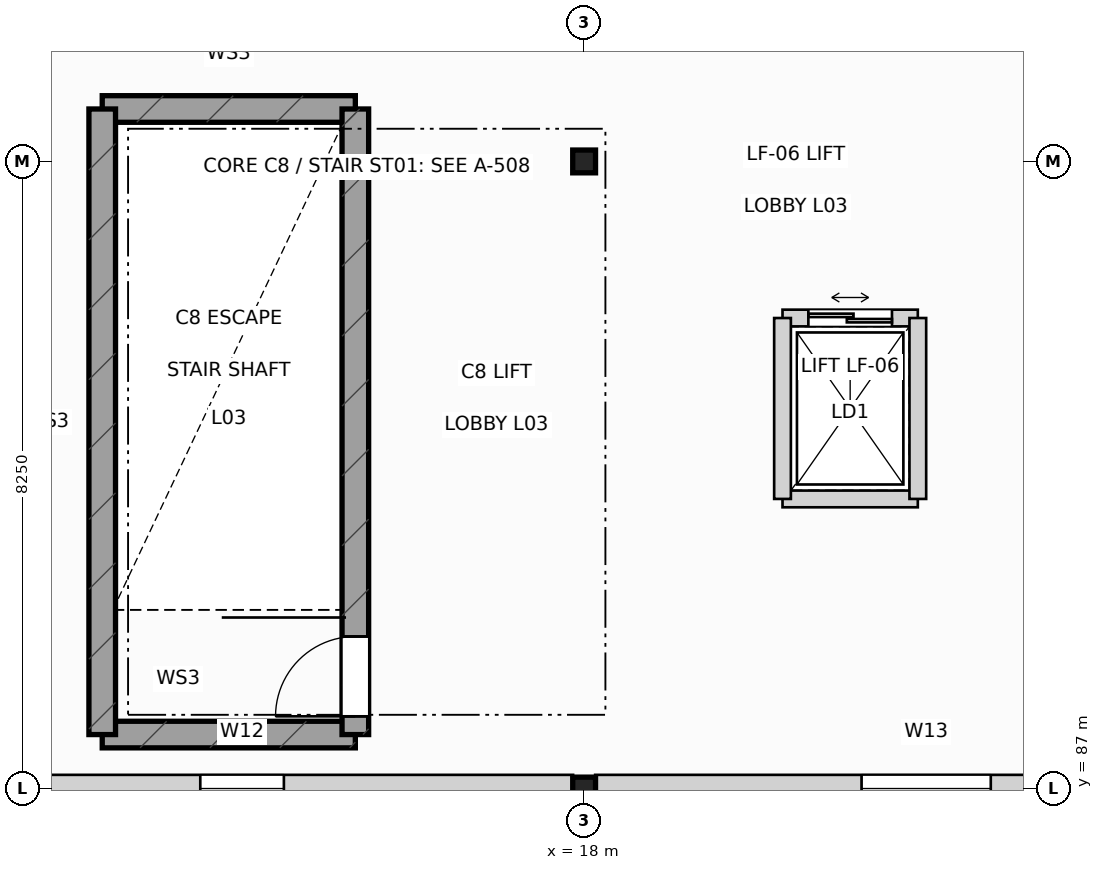
"""IFC4 building model, lengths in metres.
Left out: names, types, materials, properties, quantities, classifications, styles, units other than length and angle.
Written with IfcOpenShell. Run it as: python <this file> out.ifc"""

import sys

from ifc_helpers import new_model, si_unit, direction, frame, frame_2d, origin, origin_2d, place, context, subcontext, project, spatial, rectangle, i_section, extrude, element, fill, save


model = new_model("IFC4")
c1 = context("Model", 3, precision=1e-05, world=origin(), true_north=direction((0.0, 1.0)))
c2 = subcontext(c1, "Body", "Model", "MODEL_VIEW")
j1 = project(units=[si_unit("LENGTHUNIT", "METRE"), si_unit("PLANEANGLEUNIT", "RADIAN")], contexts=[c1])
p1 = place(None, origin())
s1 = spatial("IfcSite", under=j1, at=p1, CompositionType="ELEMENT")
p2 = place(p1, origin())
s2 = spatial("IfcBuilding", under=s1, at=p2, CompositionType="ELEMENT")
p3 = place(p2, frame((0.0, 0.0, 16.8)))
s3 = spatial("IfcBuildingStorey", under=s2, at=p3, CompositionType="ELEMENT", Elevation=16.8)
for number, where, z_axis, x_axis in (
    (1, (18.0, 87.0, 0.0), (0.0, 0.0, 1.0), (1.0, 0.0, 0.0)),
    (2, (18.0, 95.25, 0.0), (0.0, 0.0, 1.0), (1.0, 0.0, 0.0)),
):
    element("IfcColumn", number, at=place(p3, frame(where, z_axis=z_axis, x_axis=x_axis)), inside=s3, PredefinedType="COLUMN", context=c2, shape_type="SweptSolid", body=[
        extrude(i_section(OverallWidth=0.3, OverallDepth=0.3, WebThickness=0.011, FlangeThickness=0.019, at=origin_2d()), origin(), (0.0, 0.0, 1.0), 4.8),
    ])
p4 = place(p3, frame((17.855, 87.0, 0.0), z_axis=(0.0, 0.0, 1.0), x_axis=(-1.0, 0.0, 0.0)))
e3 = element("IfcWall", 3, at=p4, inside=s3, PredefinedType="SOLIDWALL", context=c2, shape_type="SweptSolid", body=[
    extrude(rectangle(XDim=8.71, YDim=0.36, at=frame_2d((4.355, 0.0))), origin(), (0.0, 0.0, 1.0), 4.485),
])
p5 = place(p4, frame((3.805, 0.0, 0.85)))
e4 = element("IfcOpeningElement", 4, at=p5, cuts=e3, PredefinedType="OPENING", context=c2, shape_type="SweptSolid", body=[
    extrude(rectangle(XDim=1.1, YDim=1.8, at=frame_2d((0.55, 0.9))), frame((0.0, 0.19, 0.0), z_axis=(0.0, -1.0, 0.0), x_axis=(1.0, 0.0, 0.0)), (0.0, 0.0, 1.0), 0.38),
])
p6 = place(p3, frame((26.855, 87.0, 0.0), z_axis=(0.0, 0.0, 1.0), x_axis=(-1.0, 0.0, 0.0)))
e5 = element("IfcWall", 5, at=p6, inside=s3, PredefinedType="SOLIDWALL", context=c2, shape_type="SweptSolid", body=[
    extrude(rectangle(XDim=8.71, YDim=0.36, at=frame_2d((4.355, 0.0))), origin(), (0.0, 0.0, 1.0), 3.735),
])
p7 = place(p6, frame((3.505, 0.0, 0.85)))
e6 = element("IfcOpeningElement", 6, at=p7, cuts=e5, PredefinedType="OPENING", context=c2, shape_type="SweptSolid", body=[
    extrude(rectangle(XDim=1.7, YDim=2.15, at=frame_2d((0.85, 1.075))), frame((0.0, 0.19, 0.0), z_axis=(0.0, -1.0, 0.0), x_axis=(1.0, 0.0, 0.0)), (0.0, 0.0, 1.0), 0.38),
])
for number, where, z_axis, x_axis in (
    (7, (11.66, 87.71, 0.0), (0.0, 0.0, 1.0), (1.0, 0.0, 0.0)),
    (8, (11.66, 95.94, 0.0), (0.0, 0.0, 1.0), (1.0, 0.0, 0.0)),
):
    element("IfcWall", number, at=place(p3, frame(where, z_axis=z_axis, x_axis=x_axis)), inside=s3, PredefinedType="SHEAR", context=c2, shape_type="SweptSolid", body=[
        extrude(rectangle(XDim=3.33, YDim=0.35, at=frame_2d((1.665, 0.0))), origin(), (0.0, 0.0, 1.0), 4.52),
    ])
p8 = place(p3, frame((11.66, 87.71, 0.0), z_axis=(0.0, 0.0, 1.0), x_axis=(0.0, 1.0, 0.0)))
e9 = element("IfcWall", 9, at=p8, inside=s3, PredefinedType="SHEAR", context=c2, shape_type="SweptSolid", body=[
    extrude(rectangle(XDim=8.23, YDim=0.35, at=frame_2d((4.115, 0.0))), origin(), (0.0, 0.0, 1.0), 4.52),
])
p9 = place(p3, frame((14.99, 87.71, 0.0), z_axis=(0.0, 0.0, 1.0), x_axis=(0.0, 1.0, 0.0)))
e10 = element("IfcWall", 10, at=p9, inside=s3, PredefinedType="SHEAR", context=c2, shape_type="SweptSolid", body=[
    extrude(rectangle(XDim=8.23, YDim=0.35, at=frame_2d((4.115, 0.0))), origin(), (0.0, 0.0, 1.0), 4.52),
])
p10 = place(p9, frame((0.24, 0.0, 0.0)))
e11 = element("IfcOpeningElement", 11, at=p10, cuts=e10, PredefinedType="OPENING", context=c2, shape_type="SweptSolid", body=[
    extrude(rectangle(XDim=1.05, YDim=2.18, at=frame_2d((0.525, 1.09))), frame((0.0, 0.185, 0.0), z_axis=(0.0, -1.0, 0.0), x_axis=(1.0, 0.0, 0.0)), (0.0, 0.0, 1.0), 0.37),
])
p11 = place(p3, frame((20.61, 90.81, 0.0), z_axis=(0.0, 0.0, 1.0), x_axis=(1.0, 0.0, 0.0)))
e12 = element("IfcWall", 12, at=p11, inside=s3, PredefinedType="PARTITIONING", context=c2, shape_type="SweptSolid", body=[
    extrude(rectangle(XDim=1.78, YDim=0.22, at=frame_2d((0.89, 0.0))), origin(), (0.0, 0.0, 1.0), 4.485),
])
p12 = place(p3, frame((20.61, 93.19, 0.0), z_axis=(0.0, 0.0, 1.0), x_axis=(1.0, 0.0, 0.0)))
e13 = element("IfcWall", 13, at=p12, inside=s3, PredefinedType="PARTITIONING", context=c2, shape_type="SweptSolid", body=[
    extrude(rectangle(XDim=1.78, YDim=0.22, at=frame_2d((0.89, 0.0))), origin(), (0.0, 0.0, 1.0), 4.485),
])
p13 = place(p12, frame((0.34, 0.0, 0.0)))
e14 = element("IfcOpeningElement", 14, at=p13, cuts=e13, PredefinedType="OPENING", context=c2, shape_type="SweptSolid", body=[
    extrude(rectangle(XDim=1.1, YDim=2.18, at=frame_2d((0.55, 1.09))), frame((0.0, 0.12, 0.0), z_axis=(0.0, -1.0, 0.0), x_axis=(1.0, 0.0, 0.0)), (0.0, 0.0, 1.0), 0.24),
])
for number, where, z_axis, x_axis in (
    (15, (20.61, 90.81, 0.0), (0.0, 0.0, 1.0), (0.0, 1.0, 0.0)),
    (16, (22.39, 90.81, 0.0), (0.0, 0.0, 1.0), (0.0, 1.0, 0.0)),
):
    element("IfcWall", number, at=place(p3, frame(where, z_axis=z_axis, x_axis=x_axis)), inside=s3, PredefinedType="PARTITIONING", context=c2, shape_type="SweptSolid", body=[
        extrude(rectangle(XDim=2.38, YDim=0.22, at=frame_2d((1.19, 0.0))), origin(), (0.0, 0.0, 1.0), 4.485),
    ])
p14 = place(p5, origin())
e17 = element("IfcWindow", 17, at=p14, inside=s3, PartitioningType="SINGLE_PANEL", PredefinedType="WINDOW", context=c2, shape_type="SweptSolid", body=[
    extrude(rectangle(XDim=1.1, YDim=1.8, at=frame_2d((0.55, 0.9))), frame((0.0, 0.03, 0.0), z_axis=(0.0, -1.0, 0.0), x_axis=(1.0, 0.0, 0.0)), (0.0, 0.0, 1.0), 0.06),
])
fill(e4, e17)
p15 = place(p7, origin())
e18 = element("IfcWindow", 18, at=p15, inside=s3, PartitioningType="SINGLE_PANEL", PredefinedType="WINDOW", context=c2, shape_type="SweptSolid", body=[
    extrude(rectangle(XDim=1.7, YDim=2.15, at=frame_2d((0.85, 1.075))), frame((0.0, 0.03, 0.0), z_axis=(0.0, -1.0, 0.0), x_axis=(1.0, 0.0, 0.0)), (0.0, 0.0, 1.0), 0.06),
])
fill(e6, e18)
p16 = place(p10, origin())
e19 = element("IfcDoor", 19, at=p16, inside=s3, OperationType="SINGLE_SWING_LEFT", PredefinedType="DOOR", context=c2, shape_type="SweptSolid", body=[
    extrude(rectangle(XDim=1.05, YDim=2.18, at=frame_2d((0.525, 1.09))), frame((0.0, 0.025, 0.0), z_axis=(0.0, -1.0, 0.0), x_axis=(1.0, 0.0, 0.0)), (0.0, 0.0, 1.0), 0.05),
])
fill(e11, e19)
p17 = place(p13, origin())
e20 = element("IfcDoor", 20, at=p17, inside=s3, OperationType="DOUBLE_DOOR_SLIDING", PredefinedType="DOOR", context=c2, shape_type="SweptSolid", body=[
    extrude(rectangle(XDim=1.1, YDim=2.18, at=frame_2d((0.55, 1.09))), frame((0.0, 0.025, 0.0), z_axis=(0.0, -1.0, 0.0), x_axis=(1.0, 0.0, 0.0)), (0.0, 0.0, 1.0), 0.05),
])
fill(e14, e20)
save(model, sys.argv[1])
